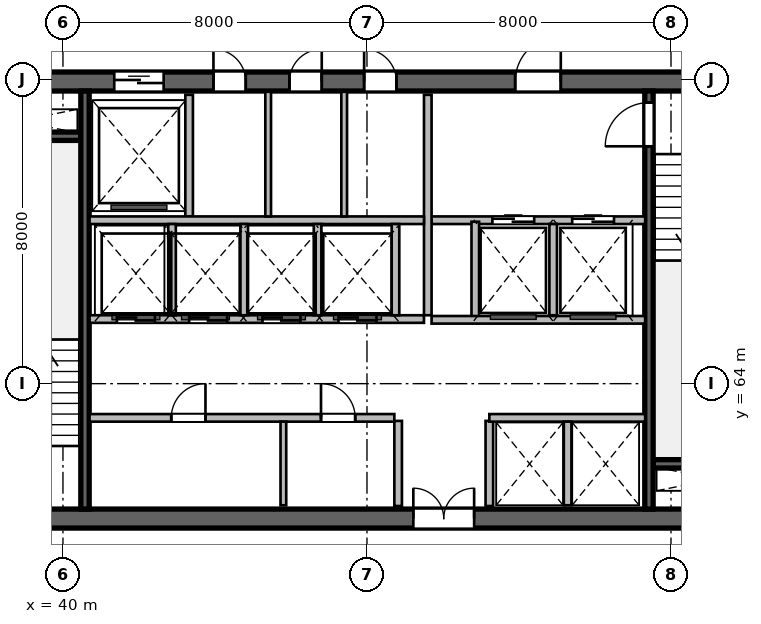
"""IFC4 building model, lengths in metres.
Left out: names, types, materials, properties, quantities, classifications, styles, units other than length and angle.
Written with IfcOpenShell. Run it as: python <this file> out.ifc"""

import sys

from ifc_helpers import new_model, si_unit, direction, frame, frame_2d, origin, place, context, subcontext, project, spatial, rectangle, extrude, source, transform, mapped, element, fill, save


model = new_model("IFC4")
c1 = context("Model", 3, precision=1e-05, world=origin(), true_north=direction((0.0, 1.0)))
c2 = subcontext(c1, "Body", "Model", "MODEL_VIEW")
j1 = project(units=[si_unit("LENGTHUNIT", "METRE"), si_unit("PLANEANGLEUNIT", "RADIAN")], contexts=[c1])
p1 = place(None, origin())
s1 = spatial("IfcSite", under=j1, at=p1, CompositionType="ELEMENT")
p2 = place(p1, origin())
s2 = spatial("IfcBuilding", under=s1, at=p2, CompositionType="ELEMENT")
p3 = place(p2, frame((0.0, 0.0, 146.7)))
s3 = spatial("IfcBuildingStorey", under=s2, at=p3, CompositionType="ELEMENT", Elevation=146.7)
m1 = source(origin(), c2, "Body", "SweptSolid", [
    extrude(rectangle(XDim=21.6, YDim=0.5, at=frame_2d((10.8, 0.0))), origin(), (0.0, 0.0, 1.0), 3.9),
])
p4 = place(p3, frame((37.2, 60.45, 0.0), z_axis=(0.0, 0.0, 1.0), x_axis=(1.0, 0.0, 0.0)))
e1 = element("IfcWall", 1, at=p4, inside=s3, PredefinedType="SHEAR", context=c2, shape_type="MappedRepresentation", body=[
    mapped(m1, transform((0.0, 0.0, 0.0), scale=1.0)),
])
p5 = place(p4, frame((1.1, 0.0, 0.0)))
e2 = element("IfcOpeningElement", 2, at=p5, cuts=e1, PredefinedType="OPENING", context=c2, shape_type="SweptSolid", body=[
    extrude(rectangle(XDim=1.15, YDim=2.15, at=frame_2d((0.575, 1.075))), frame((0.0, 0.26, 0.0), z_axis=(0.0, -1.0, 0.0), x_axis=(1.0, 0.0, 0.0)), (0.0, 0.0, 1.0), 0.52),
])
p6 = place(p4, frame((19.5, 0.0, 0.0)))
e3 = element("IfcOpeningElement", 3, at=p6, cuts=e1, PredefinedType="OPENING", context=c2, shape_type="SweptSolid", body=[
    extrude(rectangle(XDim=0.9, YDim=2.1, at=frame_2d((0.45, 1.05))), frame((0.0, 0.26, 0.0), z_axis=(0.0, -1.0, 0.0), x_axis=(1.0, 0.0, 0.0)), (0.0, 0.0, 1.0), 0.52),
])
p7 = place(p4, frame((12.02, 0.0, 0.0)))
e4 = element("IfcOpeningElement", 4, at=p7, cuts=e1, PredefinedType="OPENING", context=c2, shape_type="SweptSolid", body=[
    extrude(rectangle(XDim=1.6, YDim=2.15, at=frame_2d((0.8, 1.075))), frame((0.0, 0.26, 0.0), z_axis=(0.0, -1.0, 0.0), x_axis=(1.0, 0.0, 0.0)), (0.0, 0.0, 1.0), 0.52),
])
p8 = place(p3, frame((37.2, 71.95, 0.0), z_axis=(0.0, 0.0, 1.0), x_axis=(1.0, 0.0, 0.0)))
e5 = element("IfcWall", 5, at=p8, inside=s3, PredefinedType="SHEAR", context=c2, shape_type="MappedRepresentation", body=[
    mapped(m1, transform((0.0, 0.0, 0.0), scale=1.0)),
])
p9 = place(p8, frame((1.2, 0.0, 0.0)))
e6 = element("IfcOpeningElement", 6, at=p9, cuts=e5, PredefinedType="OPENING", context=c2, shape_type="SweptSolid", body=[
    extrude(rectangle(XDim=0.9, YDim=2.1, at=frame_2d((0.45, 1.05))), frame((0.0, 0.26, 0.0), z_axis=(0.0, -1.0, 0.0), x_axis=(1.0, 0.0, 0.0)), (0.0, 0.0, 1.0), 0.52),
])
p10 = place(p8, frame((14.7, 0.0, 0.0)))
e7 = element("IfcOpeningElement", 7, at=p10, cuts=e5, PredefinedType="OPENING", context=c2, shape_type="SweptSolid", body=[
    extrude(rectangle(XDim=1.2, YDim=2.15, at=frame_2d((0.6, 1.075))), frame((0.0, 0.26, 0.0), z_axis=(0.0, -1.0, 0.0), x_axis=(1.0, 0.0, 0.0)), (0.0, 0.0, 1.0), 0.52),
])
p11 = place(p8, frame((4.15, 0.0, 0.0)))
e8 = element("IfcOpeningElement", 8, at=p11, cuts=e5, PredefinedType="OPENING", context=c2, shape_type="SweptSolid", body=[
    extrude(rectangle(XDim=1.3, YDim=2.15, at=frame_2d((0.65, 1.075))), frame((0.0, 0.26, 0.0), z_axis=(0.0, -1.0, 0.0), x_axis=(1.0, 0.0, 0.0)), (0.0, 0.0, 1.0), 0.52),
])
p12 = place(p8, frame((6.76, 0.0, 0.0)))
e9 = element("IfcOpeningElement", 9, at=p12, cuts=e5, PredefinedType="OPENING", context=c2, shape_type="SweptSolid", body=[
    extrude(rectangle(XDim=0.85, YDim=2.1, at=frame_2d((0.425, 1.05))), frame((0.0, 0.26, 0.0), z_axis=(0.0, -1.0, 0.0), x_axis=(1.0, 0.0, 0.0)), (0.0, 0.0, 1.0), 0.52),
])
p13 = place(p8, frame((8.76, 0.0, 0.0)))
e10 = element("IfcOpeningElement", 10, at=p13, cuts=e5, PredefinedType="OPENING", context=c2, shape_type="SweptSolid", body=[
    extrude(rectangle(XDim=0.85, YDim=2.1, at=frame_2d((0.425, 1.05))), frame((0.0, 0.26, 0.0), z_axis=(0.0, -1.0, 0.0), x_axis=(1.0, 0.0, 0.0)), (0.0, 0.0, 1.0), 0.52),
])
p14 = place(p8, frame((10.725, 0.0, 0.0)))
e11 = element("IfcOpeningElement", 11, at=p14, cuts=e5, PredefinedType="OPENING", context=c2, shape_type="SweptSolid", body=[
    extrude(rectangle(XDim=0.85, YDim=2.1, at=frame_2d((0.425, 1.05))), frame((0.0, 0.26, 0.0), z_axis=(0.0, -1.0, 0.0), x_axis=(1.0, 0.0, 0.0)), (0.0, 0.0, 1.0), 0.52),
])
m2 = source(origin(), c2, "Body", "SweptSolid", [
    extrude(rectangle(XDim=3.27, YDim=0.22, at=frame_2d((1.635, 0.0))), origin(), (0.0, 0.0, 1.0), 3.9),
])
for number, where, z_axis, x_axis in (
    (12, (37.2, 70.51, 0.0), (0.0, 0.0, 1.0), (1.0, 0.0, 0.0)),
    (13, (55.53, 61.89, 0.0), (0.0, 0.0, 1.0), (1.0, 0.0, 0.0)),
):
    element("IfcWall", number, at=place(p3, frame(where, z_axis=z_axis, x_axis=x_axis)), inside=s3, PredefinedType="SHEAR", context=c2, shape_type="MappedRepresentation", body=[
        mapped(m2, transform((0.0, 0.0, 0.0), scale=1.0)),
    ])
m3 = source(origin(), c2, "Body", "SweptSolid", [
    extrude(rectangle(XDim=11.0, YDim=0.22, at=frame_2d((5.5, 0.0))), origin(), (0.0, 0.0, 1.0), 3.9),
])
p15 = place(p3, frame((40.58, 60.7, 0.0), z_axis=(0.0, 0.0, 1.0), x_axis=(0.0, 1.0, 0.0)))
e14 = element("IfcWall", 14, at=p15, inside=s3, PredefinedType="SHEAR", context=c2, shape_type="MappedRepresentation", body=[
    mapped(m3, transform((0.0, 0.0, 0.0), scale=1.0)),
])
p16 = place(p3, frame((55.42, 60.7, 0.0), z_axis=(0.0, 0.0, 1.0), x_axis=(0.0, 1.0, 0.0)))
e15 = element("IfcWall", 15, at=p16, inside=s3, PredefinedType="SHEAR", context=c2, shape_type="MappedRepresentation", body=[
    mapped(m3, transform((0.0, 0.0, 0.0), scale=1.0)),
])
p17 = place(p16, frame((9.545, 0.0, 0.0)))
e16 = element("IfcOpeningElement", 16, at=p17, cuts=e15, PredefinedType="OPENING", context=c2, shape_type="SweptSolid", body=[
    extrude(rectangle(XDim=1.15, YDim=2.15, at=frame_2d((0.575, 1.075))), frame((0.0, 0.12, 0.0), z_axis=(0.0, -1.0, 0.0), x_axis=(1.0, 0.0, 0.0)), (0.0, 0.0, 1.0), 0.24),
])
m4 = source(origin(), c2, "Body", "SweptSolid", [
    extrude(rectangle(XDim=2.24, YDim=0.2, at=frame_2d((1.12, 0.0))), origin(), (0.0, 0.0, 1.0), 3.65),
])
for number, where, z_axis, x_axis in (
    (17, (48.82, 60.78, 0.0), (0.0, 0.0, 1.0), (0.0, 1.0, 0.0)),
    (18, (51.22, 60.78, 0.0), (0.0, 0.0, 1.0), (0.0, 1.0, 0.0)),
):
    element("IfcWall", number, at=place(p3, frame(where, z_axis=z_axis, x_axis=x_axis)), inside=s3, PredefinedType="SOLIDWALL", context=c2, shape_type="MappedRepresentation", body=[
        mapped(m4, transform((0.0, 0.0, 0.0), scale=1.0)),
    ])
m5 = source(origin(), c2, "Body", "SweptSolid", [
    extrude(rectangle(XDim=5.62, YDim=0.2, at=frame_2d((2.81, 0.0))), origin(), (0.0, 0.0, 1.0), 3.65),
])
p18 = place(p3, frame((49.7, 68.3, 0.0), z_axis=(0.0, 0.0, 1.0), x_axis=(1.0, 0.0, 0.0)))
e19 = element("IfcWall", 19, at=p18, inside=s3, PredefinedType="SOLIDWALL", context=c2, shape_type="MappedRepresentation", body=[
    mapped(m5, transform((0.0, 0.0, 0.0), scale=1.0)),
])
p19 = place(p18, frame((1.6, 0.0, 0.0)))
e20 = element("IfcOpeningElement", 20, at=p19, cuts=e19, PredefinedType="OPENING", context=c2, shape_type="SweptSolid", body=[
    extrude(rectangle(XDim=1.1, YDim=2.15, at=frame_2d((0.55, 1.075))), frame((0.0, 0.11, 0.0), z_axis=(0.0, -1.0, 0.0), x_axis=(1.0, 0.0, 0.0)), (0.0, 0.0, 1.0), 0.22),
])
p20 = place(p18, frame((3.7, 0.0, 0.0)))
e21 = element("IfcOpeningElement", 21, at=p20, cuts=e19, PredefinedType="OPENING", context=c2, shape_type="SweptSolid", body=[
    extrude(rectangle(XDim=1.1, YDim=2.15, at=frame_2d((0.55, 1.075))), frame((0.0, 0.11, 0.0), z_axis=(0.0, -1.0, 0.0), x_axis=(1.0, 0.0, 0.0)), (0.0, 0.0, 1.0), 0.22),
])
m6 = source(origin(), c2, "Body", "SweptSolid", [
    extrude(rectangle(XDim=5.8, YDim=0.2, at=frame_2d((2.9, 0.0))), origin(), (0.0, 0.0, 1.0), 3.65),
])
p21 = place(p3, frame((49.6, 65.8, 0.0), z_axis=(0.0, 0.0, 1.0), x_axis=(0.0, 1.0, 0.0)))
e22 = element("IfcWall", 22, at=p21, inside=s3, PredefinedType="SOLIDWALL", context=c2, shape_type="MappedRepresentation", body=[
    mapped(m6, transform((0.0, 0.0, 0.0), scale=1.0)),
])
m7 = source(origin(), c2, "Body", "SweptSolid", [
    extrude(rectangle(XDim=2.58, YDim=0.2, at=frame_2d((1.29, 0.0))), origin(), (0.0, 0.0, 1.0), 3.65),
])
p22 = place(p3, frame((50.85, 65.68, 0.0), z_axis=(0.0, 0.0, 1.0), x_axis=(0.0, 1.0, 0.0)))
e23 = element("IfcWall", 23, at=p22, inside=s3, PredefinedType="SOLIDWALL", context=c2, shape_type="MappedRepresentation", body=[
    mapped(m7, transform((0.0, 0.0, 0.0), scale=1.0)),
])
m8 = source(origin(), c2, "Body", "SweptSolid", [
    extrude(rectangle(XDim=2.4, YDim=0.2, at=frame_2d((1.2, 0.0))), origin(), (0.0, 0.0, 1.0), 3.65),
])
p23 = place(p3, frame((52.9, 65.8, 0.0), z_axis=(0.0, 0.0, 1.0), x_axis=(0.0, 1.0, 0.0)))
e24 = element("IfcWall", 24, at=p23, inside=s3, PredefinedType="SOLIDWALL", context=c2, shape_type="MappedRepresentation", body=[
    mapped(m8, transform((0.0, 0.0, 0.0), scale=1.0)),
])
p24 = place(p3, frame((49.7, 65.68, 0.0), z_axis=(0.0, 0.0, 1.0), x_axis=(1.0, 0.0, 0.0)))
e25 = element("IfcWall", 25, at=p24, inside=s3, PredefinedType="SOLIDWALL", context=c2, shape_type="MappedRepresentation", body=[
    mapped(m5, transform((0.0, 0.0, 0.0), scale=1.0)),
])
m9 = source(origin(), c2, "Body", "SweptSolid", [
    extrude(rectangle(XDim=3.2, YDim=0.2, at=frame_2d((1.6, 0.0))), origin(), (0.0, 0.0, 1.0), 3.65),
])
p25 = place(p3, frame((43.32, 68.4, 0.0), z_axis=(0.0, 0.0, 1.0), x_axis=(0.0, 1.0, 0.0)))
e26 = element("IfcWall", 26, at=p25, inside=s3, PredefinedType="SOLIDWALL", context=c2, shape_type="MappedRepresentation", body=[
    mapped(m9, transform((0.0, 0.0, 0.0), scale=1.0)),
])
m10 = source(origin(), c2, "Body", "SweptSolid", [
    extrude(rectangle(XDim=8.8, YDim=0.2, at=frame_2d((4.4, 0.0))), origin(), (0.0, 0.0, 1.0), 3.65),
])
p26 = place(p3, frame((40.7, 68.3, 0.0), z_axis=(0.0, 0.0, 1.0), x_axis=(1.0, 0.0, 0.0)))
e27 = element("IfcWall", 27, at=p26, inside=s3, PredefinedType="SOLIDWALL", context=c2, shape_type="MappedRepresentation", body=[
    mapped(m10, transform((0.0, 0.0, 0.0), scale=1.0)),
])
m11 = source(origin(), c2, "Body", "SweptSolid", [
    extrude(rectangle(XDim=3.28, YDim=0.15, at=frame_2d((1.64, 0.0))), origin(), (0.0, 0.0, 1.0), 3.65),
])
for number, where, z_axis, x_axis in (
    (28, (45.4, 68.4, 0.0), (0.0, 0.0, 1.0), (0.0, 1.0, 0.0)),
    (29, (47.4, 68.4, 0.0), (0.0, 0.0, 1.0), (0.0, 1.0, 0.0)),
):
    element("IfcWall", number, at=place(p3, frame(where, z_axis=z_axis, x_axis=x_axis)), inside=s3, PredefinedType="PARTITIONING", context=c2, shape_type="MappedRepresentation", body=[
        mapped(m11, transform((0.0, 0.0, 0.0), scale=1.0)),
    ])
m12 = source(origin(), c2, "Body", "SweptSolid", [
    extrude(rectangle(XDim=8.02, YDim=0.2, at=frame_2d((4.01, 0.0))), origin(), (0.0, 0.0, 1.0), 3.65),
])
p27 = place(p3, frame((40.7, 63.1, 0.0), z_axis=(0.0, 0.0, 1.0), x_axis=(1.0, 0.0, 0.0)))
e30 = element("IfcWall", 30, at=p27, inside=s3, PredefinedType="SOLIDWALL", context=c2, shape_type="MappedRepresentation", body=[
    mapped(m12, transform((0.0, 0.0, 0.0), scale=1.0)),
])
p28 = place(p27, frame((2.15, 0.0, 0.0)))
e31 = element("IfcOpeningElement", 31, at=p28, cuts=e30, PredefinedType="OPENING", context=c2, shape_type="SweptSolid", body=[
    extrude(rectangle(XDim=0.9, YDim=2.1, at=frame_2d((0.45, 1.05))), frame((0.0, 0.11, 0.0), z_axis=(0.0, -1.0, 0.0), x_axis=(1.0, 0.0, 0.0)), (0.0, 0.0, 1.0), 0.22),
])
p29 = place(p27, frame((6.09, 0.0, 0.0)))
e32 = element("IfcOpeningElement", 32, at=p29, cuts=e30, PredefinedType="OPENING", context=c2, shape_type="SweptSolid", body=[
    extrude(rectangle(XDim=0.9, YDim=2.1, at=frame_2d((0.45, 1.05))), frame((0.0, 0.11, 0.0), z_axis=(0.0, -1.0, 0.0), x_axis=(1.0, 0.0, 0.0)), (0.0, 0.0, 1.0), 0.22),
])
m13 = source(origin(), c2, "Body", "SweptSolid", [
    extrude(rectangle(XDim=4.1, YDim=0.2, at=frame_2d((2.05, 0.0))), origin(), (0.0, 0.0, 1.0), 3.65),
])
p30 = place(p3, frame((51.22, 63.1, 0.0), z_axis=(0.0, 0.0, 1.0), x_axis=(1.0, 0.0, 0.0)))
e33 = element("IfcWall", 33, at=p30, inside=s3, PredefinedType="SOLIDWALL", context=c2, shape_type="MappedRepresentation", body=[
    mapped(m13, transform((0.0, 0.0, 0.0), scale=1.0)),
])
m14 = source(origin(), c2, "Body", "SweptSolid", [
    extrude(rectangle(XDim=2.2, YDim=0.15, at=frame_2d((1.1, 0.0))), origin(), (0.0, 0.0, 1.0), 3.65),
])
p31 = place(p3, frame((45.8, 60.8, 0.0), z_axis=(0.0, 0.0, 1.0), x_axis=(0.0, 1.0, 0.0)))
e34 = element("IfcWall", 34, at=p31, inside=s3, PredefinedType="PARTITIONING", context=c2, shape_type="MappedRepresentation", body=[
    mapped(m14, transform((0.0, 0.0, 0.0), scale=1.0)),
])
m15 = source(origin(), c2, "Body", "SweptSolid", [
    extrude(rectangle(XDim=2.2, YDim=0.2, at=frame_2d((1.1, 0.0))), origin(), (0.0, 0.0, 1.0), 3.65),
])
p32 = place(p3, frame((53.28, 60.8, 0.0), z_axis=(0.0, 0.0, 1.0), x_axis=(0.0, 1.0, 0.0)))
e35 = element("IfcWall", 35, at=p32, inside=s3, PredefinedType="SOLIDWALL", context=c2, shape_type="MappedRepresentation", body=[
    mapped(m15, transform((0.0, 0.0, 0.0), scale=1.0)),
])
p33 = place(p3, frame((40.7, 65.7, 0.0), z_axis=(0.0, 0.0, 1.0), x_axis=(1.0, 0.0, 0.0)))
e36 = element("IfcWall", 36, at=p33, inside=s3, PredefinedType="SOLIDWALL", context=c2, shape_type="MappedRepresentation", body=[
    mapped(m10, transform((0.0, 0.0, 0.0), scale=1.0)),
])
p34 = place(p33, frame((0.72, 0.0, 0.0)))
e37 = element("IfcOpeningElement", 37, at=p34, cuts=e36, PredefinedType="OPENING", context=c2, shape_type="SweptSolid", body=[
    extrude(rectangle(XDim=1.0, YDim=2.15, at=frame_2d((0.5, 1.075))), frame((0.0, 0.11, 0.0), z_axis=(0.0, -1.0, 0.0), x_axis=(1.0, 0.0, 0.0)), (0.0, 0.0, 1.0), 0.22),
])
p35 = place(p33, frame((2.62, 0.0, 0.0)))
e38 = element("IfcOpeningElement", 38, at=p35, cuts=e36, PredefinedType="OPENING", context=c2, shape_type="SweptSolid", body=[
    extrude(rectangle(XDim=1.0, YDim=2.15, at=frame_2d((0.5, 1.075))), frame((0.0, 0.11, 0.0), z_axis=(0.0, -1.0, 0.0), x_axis=(1.0, 0.0, 0.0)), (0.0, 0.0, 1.0), 0.22),
])
p36 = place(p33, frame((4.55, 0.0, 0.0)))
e39 = element("IfcOpeningElement", 39, at=p36, cuts=e36, PredefinedType="OPENING", context=c2, shape_type="SweptSolid", body=[
    extrude(rectangle(XDim=1.0, YDim=2.15, at=frame_2d((0.5, 1.075))), frame((0.0, 0.11, 0.0), z_axis=(0.0, -1.0, 0.0), x_axis=(1.0, 0.0, 0.0)), (0.0, 0.0, 1.0), 0.22),
])
p37 = place(p33, frame((6.55, 0.0, 0.0)))
e40 = element("IfcOpeningElement", 40, at=p37, cuts=e36, PredefinedType="OPENING", context=c2, shape_type="SweptSolid", body=[
    extrude(rectangle(XDim=1.0, YDim=2.15, at=frame_2d((0.5, 1.075))), frame((0.0, 0.11, 0.0), z_axis=(0.0, -1.0, 0.0), x_axis=(1.0, 0.0, 0.0)), (0.0, 0.0, 1.0), 0.22),
])
for number, where, z_axis, x_axis in (
    (41, (48.75, 65.8, 0.0), (0.0, 0.0, 1.0), (0.0, 1.0, 0.0)),
    (42, (42.87, 65.8, 0.0), (0.0, 0.0, 1.0), (0.0, 1.0, 0.0)),
    (43, (44.77, 65.8, 0.0), (0.0, 0.0, 1.0), (0.0, 1.0, 0.0)),
    (44, (46.7, 65.8, 0.0), (0.0, 0.0, 1.0), (0.0, 1.0, 0.0)),
):
    element("IfcWall", number, at=place(p3, frame(where, z_axis=z_axis, x_axis=x_axis)), inside=s3, PredefinedType="SOLIDWALL", context=c2, shape_type="MappedRepresentation", body=[
        mapped(m8, transform((0.0, 0.0, 0.0), scale=1.0)),
    ])
m16 = source(origin(), c2, "Body", "SweptSolid", [
    extrude(rectangle(XDim=1.15, YDim=2.15, at=frame_2d((0.575, 1.075))), frame((0.0, 0.025, 0.0), z_axis=(0.0, -1.0, 0.0), x_axis=(1.0, 0.0, 0.0)), (0.0, 0.0, 1.0), 0.05),
])
p38 = place(p17, origin())
e45 = element("IfcDoor", 45, at=p38, inside=s3, OperationType="SINGLE_SWING_LEFT", PredefinedType="DOOR", context=c2, shape_type="MappedRepresentation", body=[
    mapped(m16, transform((0.0, 0.0, 0.0), scale=1.0)),
])
fill(e16, e45)
m17 = source(origin(), c2, "Body", "SweptSolid", [
    extrude(rectangle(XDim=1.6, YDim=2.15, at=frame_2d((0.8, 1.075))), frame((0.0, 0.025, 0.0), z_axis=(0.0, -1.0, 0.0), x_axis=(1.0, 0.0, 0.0)), (0.0, 0.0, 1.0), 0.05),
])
p39 = place(p7, origin())
e46 = element("IfcDoor", 46, at=p39, inside=s3, OperationType="DOUBLE_DOOR_SINGLE_SWING", PredefinedType="DOOR", context=c2, shape_type="MappedRepresentation", body=[
    mapped(m17, transform((0.0, 0.0, 0.0), scale=1.0)),
])
fill(e4, e46)
m18 = source(origin(), c2, "Body", "SweptSolid", [
    extrude(rectangle(XDim=1.2, YDim=2.15, at=frame_2d((0.6, 1.075))), frame((0.0, 0.025, 0.0), z_axis=(0.0, -1.0, 0.0), x_axis=(1.0, 0.0, 0.0)), (0.0, 0.0, 1.0), 0.05),
])
p40 = place(p10, origin())
e47 = element("IfcDoor", 47, at=p40, inside=s3, OperationType="SINGLE_SWING_RIGHT", PredefinedType="DOOR", context=c2, shape_type="MappedRepresentation", body=[
    mapped(m18, transform((0.0, 0.0, 0.0), scale=1.0)),
])
fill(e7, e47)
m19 = source(origin(), c2, "Body", "SweptSolid", [
    extrude(rectangle(XDim=1.1, YDim=2.15, at=frame_2d((0.55, 1.075))), frame((0.0, 0.025, 0.0), z_axis=(0.0, -1.0, 0.0), x_axis=(1.0, 0.0, 0.0)), (0.0, 0.0, 1.0), 0.05),
])
p41 = place(p19, origin())
e48 = element("IfcDoor", 48, at=p41, inside=s3, OperationType="DOUBLE_DOOR_SLIDING", PredefinedType="DOOR", context=c2, shape_type="MappedRepresentation", body=[
    mapped(m19, transform((0.0, 0.0, 0.0), scale=1.0)),
])
fill(e20, e48)
p42 = place(p20, origin())
e49 = element("IfcDoor", 49, at=p42, inside=s3, OperationType="DOUBLE_DOOR_SLIDING", PredefinedType="DOOR", context=c2, shape_type="MappedRepresentation", body=[
    mapped(m19, transform((0.0, 0.0, 0.0), scale=1.0)),
])
fill(e21, e49)
m20 = source(origin(), c2, "Body", "SweptSolid", [
    extrude(rectangle(XDim=1.3, YDim=2.15, at=frame_2d((0.65, 1.075))), frame((0.0, 0.025, 0.0), z_axis=(0.0, -1.0, 0.0), x_axis=(1.0, 0.0, 0.0)), (0.0, 0.0, 1.0), 0.05),
])
p43 = place(p11, origin())
e50 = element("IfcDoor", 50, at=p43, inside=s3, OperationType="DOUBLE_DOOR_SLIDING", PredefinedType="DOOR", context=c2, shape_type="MappedRepresentation", body=[
    mapped(m20, transform((0.0, 0.0, 0.0), scale=1.0)),
])
fill(e8, e50)
m21 = source(origin(), c2, "Body", "SweptSolid", [
    extrude(rectangle(XDim=0.85, YDim=2.1, at=frame_2d((0.425, 1.05))), frame((0.0, 0.025, 0.0), z_axis=(0.0, -1.0, 0.0), x_axis=(1.0, 0.0, 0.0)), (0.0, 0.0, 1.0), 0.05),
])
p44 = place(p12, origin())
e51 = element("IfcDoor", 51, at=p44, inside=s3, OperationType="SINGLE_SWING_LEFT", PredefinedType="DOOR", context=c2, shape_type="MappedRepresentation", body=[
    mapped(m21, transform((0.0, 0.0, 0.0), scale=1.0)),
])
fill(e9, e51)
p45 = place(p13, origin())
e52 = element("IfcDoor", 52, at=p45, inside=s3, OperationType="SINGLE_SWING_RIGHT", PredefinedType="DOOR", context=c2, shape_type="MappedRepresentation", body=[
    mapped(m21, transform((0.0, 0.0, 0.0), scale=1.0)),
])
fill(e10, e52)
p46 = place(p14, origin())
e53 = element("IfcDoor", 53, at=p46, inside=s3, OperationType="SINGLE_SWING_LEFT", PredefinedType="DOOR", context=c2, shape_type="MappedRepresentation", body=[
    mapped(m21, transform((0.0, 0.0, 0.0), scale=1.0)),
])
fill(e11, e53)
m22 = source(origin(), c2, "Body", "SweptSolid", [
    extrude(rectangle(XDim=0.9, YDim=2.1, at=frame_2d((0.45, 1.05))), frame((0.0, 0.025, 0.0), z_axis=(0.0, -1.0, 0.0), x_axis=(1.0, 0.0, 0.0)), (0.0, 0.0, 1.0), 0.05),
])
p47 = place(p28, origin())
e54 = element("IfcDoor", 54, at=p47, inside=s3, OperationType="SINGLE_SWING_RIGHT", PredefinedType="DOOR", context=c2, shape_type="MappedRepresentation", body=[
    mapped(m22, transform((0.0, 0.0, 0.0), scale=1.0)),
])
fill(e31, e54)
p48 = place(p29, origin())
e55 = element("IfcDoor", 55, at=p48, inside=s3, OperationType="SINGLE_SWING_LEFT", PredefinedType="DOOR", context=c2, shape_type="MappedRepresentation", body=[
    mapped(m22, transform((0.0, 0.0, 0.0), scale=1.0)),
])
fill(e32, e55)
m23 = source(origin(), c2, "Body", "SweptSolid", [
    extrude(rectangle(XDim=1.0, YDim=2.15, at=frame_2d((0.5, 1.075))), frame((0.0, 0.025, 0.0), z_axis=(0.0, -1.0, 0.0), x_axis=(1.0, 0.0, 0.0)), (0.0, 0.0, 1.0), 0.05),
])
p49 = place(p34, origin())
e56 = element("IfcDoor", 56, at=p49, inside=s3, OperationType="DOUBLE_DOOR_SLIDING", PredefinedType="DOOR", context=c2, shape_type="MappedRepresentation", body=[
    mapped(m23, transform((0.0, 0.0, 0.0), scale=1.0)),
])
fill(e37, e56)
p50 = place(p35, origin())
e57 = element("IfcDoor", 57, at=p50, inside=s3, OperationType="DOUBLE_DOOR_SLIDING", PredefinedType="DOOR", context=c2, shape_type="MappedRepresentation", body=[
    mapped(m23, transform((0.0, 0.0, 0.0), scale=1.0)),
])
fill(e38, e57)
p51 = place(p36, origin())
e58 = element("IfcDoor", 58, at=p51, inside=s3, OperationType="DOUBLE_DOOR_SLIDING", PredefinedType="DOOR", context=c2, shape_type="MappedRepresentation", body=[
    mapped(m23, transform((0.0, 0.0, 0.0), scale=1.0)),
])
fill(e39, e58)
p52 = place(p37, origin())
e59 = element("IfcDoor", 59, at=p52, inside=s3, OperationType="DOUBLE_DOOR_SLIDING", PredefinedType="DOOR", context=c2, shape_type="MappedRepresentation", body=[
    mapped(m23, transform((0.0, 0.0, 0.0), scale=1.0)),
])
fill(e40, e59)
save(model, sys.argv[1])
